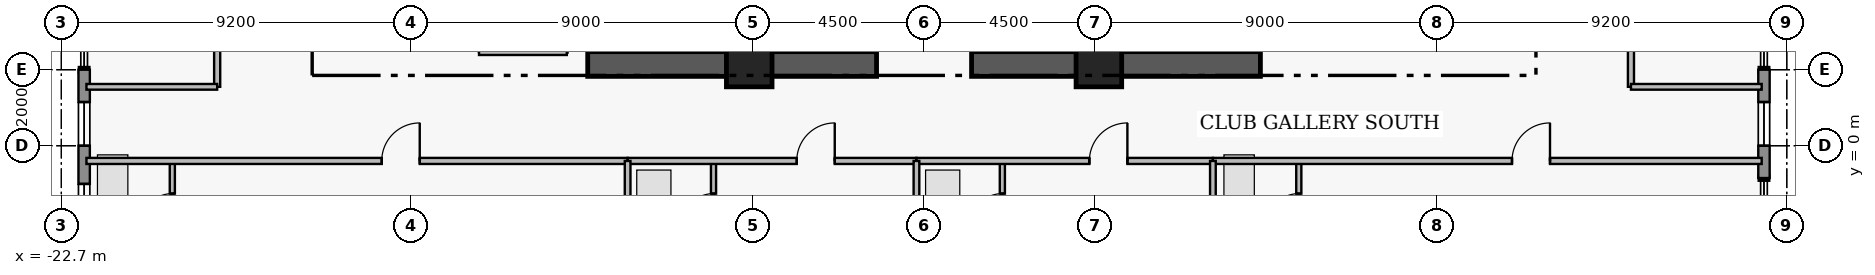
"""IFC4 building model, lengths in metres.
Left out: names, types, materials, properties, quantities, classifications, styles, units other than length and angle.
Written with IfcOpenShell. Run it as: python <this file> out.ifc"""

import sys

from ifc_helpers import new_model, si_unit, direction, frame, frame_2d, origin, origin_2d, place, context, subcontext, project, spatial, rectangle, extrude, element, fill, save


model = new_model("IFC4")
c1 = context("Model", 3, precision=1e-05, world=origin(), true_north=direction((0.0, 1.0)))
c2 = subcontext(c1, "Body", "Model", "MODEL_VIEW")
j1 = project(units=[si_unit("LENGTHUNIT", "METRE"), si_unit("PLANEANGLEUNIT", "RADIAN")], contexts=[c1])
p1 = place(None, origin())
s1 = spatial("IfcSite", under=j1, at=p1, CompositionType="ELEMENT")
p2 = place(p1, origin())
s2 = spatial("IfcBuilding", under=s1, at=p2, CompositionType="ELEMENT")
p3 = place(p2, frame((0.0, 0.0, 203.65)))
s3 = spatial("IfcBuildingStorey", under=s2, at=p3, CompositionType="ELEMENT", Elevation=203.65)
for number, where, z_axis, x_axis in (
    (1, (-8.85, 2.15, 0.0), (0.0, 0.0, 1.0), (1.0, 0.0, 0.0)),
    (2, (1.25, 2.15, 0.0), (0.0, 0.0, 1.0), (1.0, 0.0, 0.0)),
):
    element("IfcWall", number, at=place(p3, frame(where, z_axis=z_axis, x_axis=x_axis)), inside=s3, PredefinedType="SHEAR", context=c2, shape_type="SweptSolid", body=[
        extrude(rectangle(XDim=7.6, YDim=0.65, at=frame_2d((3.8, 0.0))), origin(), (0.0, 0.0, 1.0), 3.53),
    ])
for number, where, z_axis, x_axis in (
    (3, (-4.6, 2.15, 0.0), (0.0, 0.0, 1.0), (1.0, 0.0, 0.0)),
    (4, (4.6, 2.15, 0.0), (0.0, 0.0, 1.0), (1.0, 0.0, 0.0)),
):
    element("IfcColumn", number, at=place(p3, frame(where, z_axis=z_axis, x_axis=x_axis)), inside=s3, PredefinedType="COLUMN", context=c2, shape_type="SweptSolid", body=[
        extrude(rectangle(XDim=1.2, YDim=1.2, at=origin_2d()), origin(), (0.0, 0.0, 1.0), 3.75),
    ])
p4 = place(p3, frame((-22.1, -4.2, 0.0), z_axis=(0.0, 0.0, 1.0), x_axis=(0.0, 1.0, 0.0)))
e5 = element("IfcWall", 5, at=p4, inside=s3, PredefinedType="STANDARD", context=c2, shape_type="SweptSolid", body=[
    extrude(rectangle(XDim=6.2, YDim=0.3, at=frame_2d((3.1, 0.0))), origin(), (0.0, 0.0, 1.0), 3.53),
])
p5 = place(p4, frame((2.045, 0.0, 0.95)))
e6 = element("IfcOpeningElement", 6, at=p5, cuts=e5, PredefinedType="OPENING", context=c2, shape_type="SweptSolid", body=[
    extrude(rectangle(XDim=1.15, YDim=1.55, at=frame_2d((0.575, 0.775))), frame((0.0, 0.16, 0.0), z_axis=(0.0, -1.0, 0.0), x_axis=(1.0, 0.0, 0.0)), (0.0, 0.0, 1.0), 0.32),
])
p6 = place(p4, frame((4.2, 0.0, 0.95)))
e7 = element("IfcOpeningElement", 7, at=p6, cuts=e5, PredefinedType="OPENING", context=c2, shape_type="SweptSolid", body=[
    extrude(rectangle(XDim=1.15, YDim=1.55, at=frame_2d((0.575, 0.775))), frame((0.0, 0.16, 0.0), z_axis=(0.0, -1.0, 0.0), x_axis=(1.0, 0.0, 0.0)), (0.0, 0.0, 1.0), 0.32),
])
p7 = place(p3, frame((22.1, 2.0, 0.0), z_axis=(0.0, 0.0, 1.0), x_axis=(0.0, -1.0, 0.0)))
e8 = element("IfcWall", 8, at=p7, inside=s3, PredefinedType="STANDARD", context=c2, shape_type="SweptSolid", body=[
    extrude(rectangle(XDim=2.85, YDim=0.3, at=frame_2d((1.425, 0.0))), origin(), (0.0, 0.0, 1.0), 3.53),
])
p8 = place(p7, frame((0.85, 0.0, 0.95)))
e9 = element("IfcOpeningElement", 9, at=p8, cuts=e8, PredefinedType="OPENING", context=c2, shape_type="SweptSolid", body=[
    extrude(rectangle(XDim=1.15, YDim=1.55, at=frame_2d((0.575, 0.775))), frame((0.0, 0.16, 0.0), z_axis=(0.0, -1.0, 0.0), x_axis=(1.0, 0.0, 0.0)), (0.0, 0.0, 1.0), 0.32),
])
p9 = place(p3, frame((-19.78, -2.76, 0.0), z_axis=(0.0, 0.0, 1.0), x_axis=(0.0, 1.0, 0.0)))
e10 = element("IfcWall", 10, at=p9, inside=s3, PredefinedType="PLUMBINGWALL", context=c2, shape_type="SweptSolid", body=[
    extrude(rectangle(XDim=2.36, YDim=0.135, at=frame_2d((1.18, 0.0))), origin(), (0.0, 0.0, 1.0), 3.53),
])
p10 = place(p9, frame((0.65, 0.0, 0.0)))
e11 = element("IfcOpeningElement", 11, at=p10, cuts=e10, PredefinedType="OPENING", context=c2, shape_type="SweptSolid", body=[
    extrude(rectangle(XDim=0.85, YDim=2.1, at=frame_2d((0.425, 1.05))), frame((0.0, 0.077, 0.0), z_axis=(0.0, -1.0, 0.0), x_axis=(1.0, 0.0, 0.0)), (0.0, 0.0, 1.0), 0.155),
])
p11 = place(p3, frame((-22.04, -0.4, 0.0), z_axis=(0.0, 0.0, 1.0), x_axis=(1.0, 0.0, 0.0)))
e12 = element("IfcWall", 12, at=p11, inside=s3, PredefinedType="PARTITIONING", context=c2, shape_type="SweptSolid", body=[
    extrude(rectangle(XDim=14.24, YDim=0.16, at=frame_2d((7.12, 0.0))), origin(), (0.0, 0.0, 1.0), 3.53),
])
p12 = place(p11, frame((7.77, 0.0, 0.0)))
e13 = element("IfcOpeningElement", 13, at=p12, cuts=e12, PredefinedType="OPENING", context=c2, shape_type="SweptSolid", body=[
    extrude(rectangle(XDim=1.0, YDim=2.15, at=frame_2d((0.5, 1.075))), frame((0.0, 0.09, 0.0), z_axis=(0.0, -1.0, 0.0), x_axis=(1.0, 0.0, 0.0)), (0.0, 0.0, 1.0), 0.18),
])
p13 = place(p3, frame((-5.54, -2.76, 0.0), z_axis=(0.0, 0.0, 1.0), x_axis=(0.0, 1.0, 0.0)))
e14 = element("IfcWall", 14, at=p13, inside=s3, PredefinedType="PLUMBINGWALL", context=c2, shape_type="SweptSolid", body=[
    extrude(rectangle(XDim=2.36, YDim=0.135, at=frame_2d((1.18, 0.0))), origin(), (0.0, 0.0, 1.0), 3.53),
])
p14 = place(p13, frame((0.65, 0.0, 0.0)))
e15 = element("IfcOpeningElement", 15, at=p14, cuts=e14, PredefinedType="OPENING", context=c2, shape_type="SweptSolid", body=[
    extrude(rectangle(XDim=0.85, YDim=2.1, at=frame_2d((0.425, 1.05))), frame((0.0, 0.077, 0.0), z_axis=(0.0, -1.0, 0.0), x_axis=(1.0, 0.0, 0.0)), (0.0, 0.0, 1.0), 0.155),
])
p15 = place(p3, frame((-7.8, -0.4, 0.0), z_axis=(0.0, 0.0, 1.0), x_axis=(1.0, 0.0, 0.0)))
e16 = element("IfcWall", 16, at=p15, inside=s3, PredefinedType="PARTITIONING", context=c2, shape_type="SweptSolid", body=[
    extrude(rectangle(XDim=7.6, YDim=0.16, at=frame_2d((3.8, 0.0))), origin(), (0.0, 0.0, 1.0), 3.53),
])
p16 = place(p15, frame((4.45, 0.0, 0.0)))
e17 = element("IfcOpeningElement", 17, at=p16, cuts=e16, PredefinedType="OPENING", context=c2, shape_type="SweptSolid", body=[
    extrude(rectangle(XDim=1.0, YDim=2.15, at=frame_2d((0.5, 1.075))), frame((0.0, 0.09, 0.0), z_axis=(0.0, -1.0, 0.0), x_axis=(1.0, 0.0, 0.0)), (0.0, 0.0, 1.0), 0.18),
])
p17 = place(p3, frame((2.06, -2.76, 0.0), z_axis=(0.0, 0.0, 1.0), x_axis=(0.0, 1.0, 0.0)))
e18 = element("IfcWall", 18, at=p17, inside=s3, PredefinedType="PLUMBINGWALL", context=c2, shape_type="SweptSolid", body=[
    extrude(rectangle(XDim=2.36, YDim=0.135, at=frame_2d((1.18, 0.0))), origin(), (0.0, 0.0, 1.0), 3.53),
])
p18 = place(p17, frame((0.65, 0.0, 0.0)))
e19 = element("IfcOpeningElement", 19, at=p18, cuts=e18, PredefinedType="OPENING", context=c2, shape_type="SweptSolid", body=[
    extrude(rectangle(XDim=0.85, YDim=2.1, at=frame_2d((0.425, 1.05))), frame((0.0, 0.077, 0.0), z_axis=(0.0, -1.0, 0.0), x_axis=(1.0, 0.0, 0.0)), (0.0, 0.0, 1.0), 0.155),
])
p19 = place(p3, frame((-0.2, -0.4, 0.0), z_axis=(0.0, 0.0, 1.0), x_axis=(1.0, 0.0, 0.0)))
e20 = element("IfcWall", 20, at=p19, inside=s3, PredefinedType="PARTITIONING", context=c2, shape_type="SweptSolid", body=[
    extrude(rectangle(XDim=7.8, YDim=0.16, at=frame_2d((3.9, 0.0))), origin(), (0.0, 0.0, 1.0), 3.53),
])
p20 = place(p19, frame((4.55, 0.0, 0.0)))
e21 = element("IfcOpeningElement", 21, at=p20, cuts=e20, PredefinedType="OPENING", context=c2, shape_type="SweptSolid", body=[
    extrude(rectangle(XDim=1.0, YDim=2.15, at=frame_2d((0.5, 1.075))), frame((0.0, 0.09, 0.0), z_axis=(0.0, -1.0, 0.0), x_axis=(1.0, 0.0, 0.0)), (0.0, 0.0, 1.0), 0.18),
])
p21 = place(p3, frame((9.86, -2.76, 0.0), z_axis=(0.0, 0.0, 1.0), x_axis=(0.0, 1.0, 0.0)))
e22 = element("IfcWall", 22, at=p21, inside=s3, PredefinedType="PLUMBINGWALL", context=c2, shape_type="SweptSolid", body=[
    extrude(rectangle(XDim=2.36, YDim=0.135, at=frame_2d((1.18, 0.0))), origin(), (0.0, 0.0, 1.0), 3.53),
])
p22 = place(p21, frame((0.65, 0.0, 0.0)))
e23 = element("IfcOpeningElement", 23, at=p22, cuts=e22, PredefinedType="OPENING", context=c2, shape_type="SweptSolid", body=[
    extrude(rectangle(XDim=0.85, YDim=2.1, at=frame_2d((0.425, 1.05))), frame((0.0, 0.077, 0.0), z_axis=(0.0, -1.0, 0.0), x_axis=(1.0, 0.0, 0.0)), (0.0, 0.0, 1.0), 0.155),
])
p23 = place(p3, frame((7.6, -0.4, 0.0), z_axis=(0.0, 0.0, 1.0), x_axis=(1.0, 0.0, 0.0)))
e24 = element("IfcWall", 24, at=p23, inside=s3, PredefinedType="PARTITIONING", context=c2, shape_type="SweptSolid", body=[
    extrude(rectangle(XDim=14.44, YDim=0.16, at=frame_2d((7.22, 0.0))), origin(), (0.0, 0.0, 1.0), 3.53),
])
p24 = place(p23, frame((7.87, 0.0, 0.0)))
e25 = element("IfcOpeningElement", 25, at=p24, cuts=e24, PredefinedType="OPENING", context=c2, shape_type="SweptSolid", body=[
    extrude(rectangle(XDim=1.0, YDim=2.15, at=frame_2d((0.5, 1.075))), frame((0.0, 0.09, 0.0), z_axis=(0.0, -1.0, 0.0), x_axis=(1.0, 0.0, 0.0)), (0.0, 0.0, 1.0), 0.18),
])
p25 = place(p3, frame((18.6, 1.55, 0.0), z_axis=(0.0, 0.0, 1.0), x_axis=(0.0, 1.0, 0.0)))
e26 = element("IfcWall", 26, at=p25, inside=s3, PredefinedType="PARTITIONING", context=c2, shape_type="SweptSolid", body=[
    extrude(rectangle(XDim=5.2, YDim=0.16, at=frame_2d((2.6, 0.0))), origin(), (0.0, 0.0, 1.0), 3.53),
])
p26 = place(p25, frame((2.14, 0.0, 0.0)))
e27 = element("IfcOpeningElement", 27, at=p26, cuts=e26, PredefinedType="OPENING", context=c2, shape_type="SweptSolid", body=[
    extrude(rectangle(XDim=0.92, YDim=2.12, at=frame_2d((0.46, 1.06))), frame((0.0, 0.09, 0.0), z_axis=(0.0, -1.0, 0.0), x_axis=(1.0, 0.0, 0.0)), (0.0, 0.0, 1.0), 0.18),
])
p27 = place(p3, frame((-18.6, 1.55, 0.0), z_axis=(0.0, 0.0, 1.0), x_axis=(0.0, 1.0, 0.0)))
e28 = element("IfcWall", 28, at=p27, inside=s3, PredefinedType="PARTITIONING", context=c2, shape_type="SweptSolid", body=[
    extrude(rectangle(XDim=6.35, YDim=0.16, at=frame_2d((3.175, 0.0))), origin(), (0.0, 0.0, 1.0), 3.53),
])
p28 = place(p27, frame((2.7, 0.0, 0.0)))
e29 = element("IfcOpeningElement", 29, at=p28, cuts=e28, PredefinedType="OPENING", context=c2, shape_type="SweptSolid", body=[
    extrude(rectangle(XDim=0.95, YDim=2.15, at=frame_2d((0.475, 1.075))), frame((0.0, 0.09, 0.0), z_axis=(0.0, -1.0, 0.0), x_axis=(1.0, 0.0, 0.0)), (0.0, 0.0, 1.0), 0.18),
])
p29 = place(p3, frame((-11.71, 2.47, 0.0), z_axis=(0.0, 0.0, 1.0), x_axis=(1.0, 0.0, 0.0)))
e30 = element("IfcWall", 30, at=p29, inside=s3, PredefinedType="PARTITIONING", context=c2, shape_type="SweptSolid", body=[
    extrude(rectangle(XDim=2.31, YDim=0.165, at=frame_2d((1.155, 0.0))), origin(), (0.0, 0.0, 1.0), 2.43),
])
for number, where, z_axis, x_axis in (
    (31, (-7.8, -7.52, 0.0), (0.0, 0.0, 1.0), (0.0, 1.0, 0.0)),
    (32, (-0.2, -7.52, 0.0), (0.0, 0.0, 1.0), (0.0, 1.0, 0.0)),
    (33, (7.6, -7.52, 0.0), (0.0, 0.0, 1.0), (0.0, 1.0, 0.0)),
):
    element("IfcWall", number, at=place(p3, frame(where, z_axis=z_axis, x_axis=x_axis)), inside=s3, PredefinedType="PARTITIONING", context=c2, shape_type="SweptSolid", body=[
        extrude(rectangle(XDim=7.12, YDim=0.15, at=frame_2d((3.56, 0.0))), origin(), (0.0, 0.0, 1.0), 3.53),
    ])
for number, where, z_axis, x_axis in (
    (34, (18.6, 1.55, 0.0), (0.0, 0.0, 1.0), (1.0, 0.0, 0.0)),
    (35, (-22.04, 1.55, 0.0), (0.0, 0.0, 1.0), (1.0, 0.0, 0.0)),
):
    element("IfcWall", number, at=place(p3, frame(where, z_axis=z_axis, x_axis=x_axis)), inside=s3, PredefinedType="PARTITIONING", context=c2, shape_type="SweptSolid", body=[
        extrude(rectangle(XDim=3.44, YDim=0.15, at=frame_2d((1.72, 0.0))), origin(), (0.0, 0.0, 1.0), 3.53),
    ])
p30 = place(p5, origin())
e36 = element("IfcWindow", 36, at=p30, inside=s3, PartitioningType="SINGLE_PANEL", PredefinedType="WINDOW", context=c2, shape_type="SweptSolid", body=[
    extrude(rectangle(XDim=1.15, YDim=1.55, at=frame_2d((0.575, 0.775))), frame((0.0, 0.03, 0.0), z_axis=(0.0, -1.0, 0.0), x_axis=(1.0, 0.0, 0.0)), (0.0, 0.0, 1.0), 0.06),
])
fill(e6, e36)
p31 = place(p6, origin())
e37 = element("IfcWindow", 37, at=p31, inside=s3, PartitioningType="SINGLE_PANEL", PredefinedType="WINDOW", context=c2, shape_type="SweptSolid", body=[
    extrude(rectangle(XDim=1.15, YDim=1.55, at=frame_2d((0.575, 0.775))), frame((0.0, 0.03, 0.0), z_axis=(0.0, -1.0, 0.0), x_axis=(1.0, 0.0, 0.0)), (0.0, 0.0, 1.0), 0.06),
])
fill(e7, e37)
p32 = place(p8, origin())
e38 = element("IfcWindow", 38, at=p32, inside=s3, PartitioningType="SINGLE_PANEL", PredefinedType="WINDOW", context=c2, shape_type="SweptSolid", body=[
    extrude(rectangle(XDim=1.15, YDim=1.55, at=frame_2d((0.575, 0.775))), frame((0.0, 0.03, 0.0), z_axis=(0.0, -1.0, 0.0), x_axis=(1.0, 0.0, 0.0)), (0.0, 0.0, 1.0), 0.06),
])
fill(e9, e38)
p33 = place(p10, origin())
e39 = element("IfcDoor", 39, at=p33, inside=s3, OperationType="SINGLE_SWING_LEFT", PredefinedType="DOOR", context=c2, shape_type="SweptSolid", body=[
    extrude(rectangle(XDim=0.85, YDim=2.1, at=frame_2d((0.425, 1.05))), frame((0.0, 0.025, 0.0), z_axis=(0.0, -1.0, 0.0), x_axis=(1.0, 0.0, 0.0)), (0.0, 0.0, 1.0), 0.05),
])
fill(e11, e39)
p34 = place(p12, origin())
e40 = element("IfcDoor", 40, at=p34, inside=s3, OperationType="SINGLE_SWING_RIGHT", PredefinedType="DOOR", context=c2, shape_type="SweptSolid", body=[
    extrude(rectangle(XDim=1.0, YDim=2.15, at=frame_2d((0.5, 1.075))), frame((0.0, 0.025, 0.0), z_axis=(0.0, -1.0, 0.0), x_axis=(1.0, 0.0, 0.0)), (0.0, 0.0, 1.0), 0.05),
])
fill(e13, e40)
p35 = place(p14, origin())
e41 = element("IfcDoor", 41, at=p35, inside=s3, OperationType="SINGLE_SWING_LEFT", PredefinedType="DOOR", context=c2, shape_type="SweptSolid", body=[
    extrude(rectangle(XDim=0.85, YDim=2.1, at=frame_2d((0.425, 1.05))), frame((0.0, 0.025, 0.0), z_axis=(0.0, -1.0, 0.0), x_axis=(1.0, 0.0, 0.0)), (0.0, 0.0, 1.0), 0.05),
])
fill(e15, e41)
p36 = place(p16, origin())
e42 = element("IfcDoor", 42, at=p36, inside=s3, OperationType="SINGLE_SWING_RIGHT", PredefinedType="DOOR", context=c2, shape_type="SweptSolid", body=[
    extrude(rectangle(XDim=1.0, YDim=2.15, at=frame_2d((0.5, 1.075))), frame((0.0, 0.025, 0.0), z_axis=(0.0, -1.0, 0.0), x_axis=(1.0, 0.0, 0.0)), (0.0, 0.0, 1.0), 0.05),
])
fill(e17, e42)
p37 = place(p18, origin())
e43 = element("IfcDoor", 43, at=p37, inside=s3, OperationType="SINGLE_SWING_LEFT", PredefinedType="DOOR", context=c2, shape_type="SweptSolid", body=[
    extrude(rectangle(XDim=0.85, YDim=2.1, at=frame_2d((0.425, 1.05))), frame((0.0, 0.025, 0.0), z_axis=(0.0, -1.0, 0.0), x_axis=(1.0, 0.0, 0.0)), (0.0, 0.0, 1.0), 0.05),
])
fill(e19, e43)
p38 = place(p20, origin())
e44 = element("IfcDoor", 44, at=p38, inside=s3, OperationType="SINGLE_SWING_RIGHT", PredefinedType="DOOR", context=c2, shape_type="SweptSolid", body=[
    extrude(rectangle(XDim=1.0, YDim=2.15, at=frame_2d((0.5, 1.075))), frame((0.0, 0.025, 0.0), z_axis=(0.0, -1.0, 0.0), x_axis=(1.0, 0.0, 0.0)), (0.0, 0.0, 1.0), 0.05),
])
fill(e21, e44)
p39 = place(p22, origin())
e45 = element("IfcDoor", 45, at=p39, inside=s3, OperationType="SINGLE_SWING_LEFT", PredefinedType="DOOR", context=c2, shape_type="SweptSolid", body=[
    extrude(rectangle(XDim=0.85, YDim=2.1, at=frame_2d((0.425, 1.05))), frame((0.0, 0.025, 0.0), z_axis=(0.0, -1.0, 0.0), x_axis=(1.0, 0.0, 0.0)), (0.0, 0.0, 1.0), 0.05),
])
fill(e23, e45)
p40 = place(p24, origin())
e46 = element("IfcDoor", 46, at=p40, inside=s3, OperationType="SINGLE_SWING_RIGHT", PredefinedType="DOOR", context=c2, shape_type="SweptSolid", body=[
    extrude(rectangle(XDim=1.0, YDim=2.15, at=frame_2d((0.5, 1.075))), frame((0.0, 0.025, 0.0), z_axis=(0.0, -1.0, 0.0), x_axis=(1.0, 0.0, 0.0)), (0.0, 0.0, 1.0), 0.05),
])
fill(e25, e46)
save(model, sys.argv[1])
